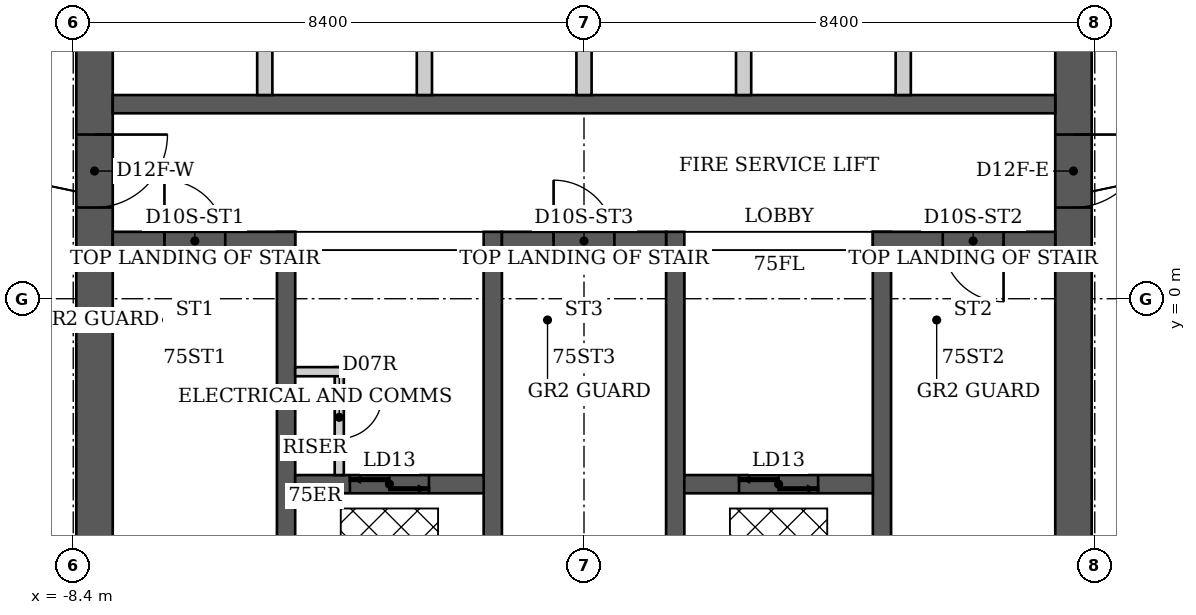
"""IFC4 building model, lengths in metres.
Left out: names, types, materials, properties, quantities, classifications, styles, units other than length and angle.
Written with IfcOpenShell. Run it as: python <this file> out.ifc"""

import sys

from ifc_helpers import new_model, si_unit, direction, frame, frame_2d, origin, place, context, subcontext, project, spatial, polyline, rectangle, outline, extrude, element, fill, save


model = new_model("IFC4")
c1 = context("Model", 3, precision=1e-05, world=origin(), true_north=direction((0.0, 1.0)))
c2 = subcontext(c1, "Body", "Model", "MODEL_VIEW")
j1 = project(units=[si_unit("LENGTHUNIT", "METRE"), si_unit("PLANEANGLEUNIT", "RADIAN")], contexts=[c1])
p1 = place(None, origin())
s1 = spatial("IfcSite", under=j1, at=p1, CompositionType="ELEMENT")
p2 = place(p1, origin())
s2 = spatial("IfcBuilding", under=s1, at=p2, CompositionType="ELEMENT")
p3 = place(p2, frame((0.0, 0.0, 298.8)))
s3 = spatial("IfcBuildingStorey", under=s2, at=p3, CompositionType="ELEMENT", Elevation=298.8)
p4 = place(p3, frame((-8.05, -6.1, 0.0), z_axis=(0.0, 0.0, 1.0), x_axis=(0.0, 1.0, 0.0)))
e1 = element("IfcWall", 1, at=p4, inside=s3, PredefinedType="SHEAR", context=c2, shape_type="SweptSolid", body=[
    extrude(outline(polyline([(0.0, 0.0), (12.2, 0.0), (12.2, 14.117), (0.0, 10.848), (0.0, 0.0)])), frame((0.0, 0.3, 0.0), z_axis=(0.0, -1.0, 0.0), x_axis=(1.0, 0.0, 0.0)), (0.0, 0.0, 1.0), 0.6),
])
p5 = place(p4, frame((7.6, 0.0, 0.0)))
e2 = element("IfcOpeningElement", 2, at=p5, cuts=e1, PredefinedType="OPENING", context=c2, shape_type="SweptSolid", body=[
    extrude(rectangle(XDim=1.2, YDim=2.2, at=frame_2d((0.6, 1.1))), frame((0.0, 0.3, 0.0), z_axis=(0.0, -1.0, 0.0), x_axis=(1.0, 0.0, 0.0)), (0.0, 0.0, 1.0), 0.6),
])
p6 = place(p3, frame((8.05, -6.1, 0.0), z_axis=(0.0, 0.0, 1.0), x_axis=(0.0, 1.0, 0.0)))
e3 = element("IfcWall", 3, at=p6, inside=s3, PredefinedType="SHEAR", context=c2, shape_type="SweptSolid", body=[
    extrude(outline(polyline([(0.0, 0.0), (12.2, 0.0), (12.2, 14.117), (0.0, 10.848), (0.0, 0.0)])), frame((0.0, 0.3, 0.0), z_axis=(0.0, -1.0, 0.0), x_axis=(1.0, 0.0, 0.0)), (0.0, 0.0, 1.0), 0.6),
])
p7 = place(p6, frame((7.6, 0.0, 0.0)))
e4 = element("IfcOpeningElement", 4, at=p7, cuts=e3, PredefinedType="OPENING", context=c2, shape_type="SweptSolid", body=[
    extrude(rectangle(XDim=1.2, YDim=2.2, at=frame_2d((0.6, 1.1))), frame((0.0, 0.3, 0.0), z_axis=(0.0, -1.0, 0.0), x_axis=(1.0, 0.0, 0.0)), (0.0, 0.0, 1.0), 0.6),
])
for number, where, z_axis, x_axis in (
    (5, (-4.9, -6.1, 0.0), (0.0, 0.0, 1.0), (0.0, 1.0, 0.0)),
    (6, (-1.5, -6.1, 0.0), (0.0, 0.0, 1.0), (0.0, 1.0, 0.0)),
    (7, (1.5, -6.1, 0.0), (0.0, 0.0, 1.0), (0.0, 1.0, 0.0)),
    (8, (4.9, -6.1, 0.0), (0.0, 0.0, 1.0), (0.0, 1.0, 0.0)),
):
    element("IfcWall", number, at=place(p3, frame(where, z_axis=z_axis, x_axis=x_axis)), inside=s3, PredefinedType="SHEAR", context=c2, shape_type="SweptSolid", body=[
        extrude(outline(polyline([(0.0, 0.0), (7.2, 0.0), (7.2, 12.777), (0.0, 10.848), (0.0, 0.0)])), frame((0.0, 0.15, 0.0), z_axis=(0.0, -1.0, 0.0), x_axis=(1.0, 0.0, 0.0)), (0.0, 0.0, 1.0), 0.3),
    ])
p8 = place(p3, frame((-7.75, 0.95, 0.0), z_axis=(0.0, 0.0, 1.0), x_axis=(1.0, 0.0, 0.0)))
e9 = element("IfcWall", 9, at=p8, inside=s3, PredefinedType="SHEAR", context=c2, shape_type="SweptSolid", body=[
    extrude(outline(polyline([(0.0, 0.0), (3.0, 0.0), (3.0, 12.697), (0.0, 12.697), (0.0, 0.0)])), frame((0.0, 0.15, 0.0), z_axis=(0.0, -1.0, 0.0), x_axis=(1.0, 0.0, 0.0)), (0.0, 0.0, 1.0), 0.3),
])
p9 = place(p8, frame((0.85, 0.0, 0.0)))
e10 = element("IfcOpeningElement", 10, at=p9, cuts=e9, PredefinedType="OPENING", context=c2, shape_type="SweptSolid", body=[
    extrude(rectangle(XDim=1.0, YDim=2.2, at=frame_2d((0.5, 1.1))), frame((0.0, 0.15, 0.0), z_axis=(0.0, -1.0, 0.0), x_axis=(1.0, 0.0, 0.0)), (0.0, 0.0, 1.0), 0.3),
])
p10 = place(p3, frame((-1.35, 0.95, 0.0), z_axis=(0.0, 0.0, 1.0), x_axis=(1.0, 0.0, 0.0)))
e11 = element("IfcWall", 11, at=p10, inside=s3, PredefinedType="SHEAR", context=c2, shape_type="SweptSolid", body=[
    extrude(outline(polyline([(0.0, 0.0), (2.7, 0.0), (2.7, 12.697), (0.0, 12.697), (0.0, 0.0)])), frame((0.0, 0.15, 0.0), z_axis=(0.0, -1.0, 0.0), x_axis=(1.0, 0.0, 0.0)), (0.0, 0.0, 1.0), 0.3),
])
p11 = place(p10, frame((0.85, 0.0, 0.0)))
e12 = element("IfcOpeningElement", 12, at=p11, cuts=e11, PredefinedType="OPENING", context=c2, shape_type="SweptSolid", body=[
    extrude(rectangle(XDim=1.0, YDim=2.2, at=frame_2d((0.5, 1.1))), frame((0.0, 0.15, 0.0), z_axis=(0.0, -1.0, 0.0), x_axis=(1.0, 0.0, 0.0)), (0.0, 0.0, 1.0), 0.3),
])
p12 = place(p3, frame((4.75, 0.95, 0.0), z_axis=(0.0, 0.0, 1.0), x_axis=(1.0, 0.0, 0.0)))
e13 = element("IfcWall", 13, at=p12, inside=s3, PredefinedType="SHEAR", context=c2, shape_type="SweptSolid", body=[
    extrude(outline(polyline([(0.0, 0.0), (3.0, 0.0), (3.0, 12.697), (0.0, 12.697), (0.0, 0.0)])), frame((0.0, 0.15, 0.0), z_axis=(0.0, -1.0, 0.0), x_axis=(1.0, 0.0, 0.0)), (0.0, 0.0, 1.0), 0.3),
])
p13 = place(p12, frame((1.15, 0.0, 0.0)))
e14 = element("IfcOpeningElement", 14, at=p13, cuts=e13, PredefinedType="OPENING", context=c2, shape_type="SweptSolid", body=[
    extrude(rectangle(XDim=1.0, YDim=2.2, at=frame_2d((0.5, 1.1))), frame((0.0, 0.15, 0.0), z_axis=(0.0, -1.0, 0.0), x_axis=(1.0, 0.0, 0.0)), (0.0, 0.0, 1.0), 0.3),
])
p14 = place(p3, frame((-4.75, -3.05, 0.0), z_axis=(0.0, 0.0, 1.0), x_axis=(1.0, 0.0, 0.0)))
e15 = element("IfcWall", 15, at=p14, inside=s3, PredefinedType="SHEAR", context=c2, shape_type="SweptSolid", body=[
    extrude(outline(polyline([(0.0, 0.0), (3.1, 0.0), (3.1, 11.625), (0.0, 11.625), (0.0, 0.0)])), frame((0.0, 0.15, 0.0), z_axis=(0.0, -1.0, 0.0), x_axis=(1.0, 0.0, 0.0)), (0.0, 0.0, 1.0), 0.3),
])
p15 = place(p14, frame((0.9, 0.0, 0.0)))
e16 = element("IfcOpeningElement", 16, at=p15, cuts=e15, PredefinedType="OPENING", context=c2, shape_type="SweptSolid", body=[
    extrude(rectangle(XDim=1.3, YDim=2.1, at=frame_2d((0.65, 1.05))), frame((0.0, 0.15, 0.0), z_axis=(0.0, -1.0, 0.0), x_axis=(1.0, 0.0, 0.0)), (0.0, 0.0, 1.0), 0.3),
])
p16 = place(p3, frame((1.65, -3.05, 0.0), z_axis=(0.0, 0.0, 1.0), x_axis=(1.0, 0.0, 0.0)))
e17 = element("IfcWall", 17, at=p16, inside=s3, PredefinedType="SHEAR", context=c2, shape_type="SweptSolid", body=[
    extrude(outline(polyline([(0.0, 0.0), (3.1, 0.0), (3.1, 11.625), (0.0, 11.625), (0.0, 0.0)])), frame((0.0, 0.15, 0.0), z_axis=(0.0, -1.0, 0.0), x_axis=(1.0, 0.0, 0.0)), (0.0, 0.0, 1.0), 0.3),
])
p17 = place(p16, frame((0.9, 0.0, 0.0)))
e18 = element("IfcOpeningElement", 18, at=p17, cuts=e17, PredefinedType="OPENING", context=c2, shape_type="SweptSolid", body=[
    extrude(rectangle(XDim=1.3, YDim=2.1, at=frame_2d((0.65, 1.05))), frame((0.0, 0.15, 0.0), z_axis=(0.0, -1.0, 0.0), x_axis=(1.0, 0.0, 0.0)), (0.0, 0.0, 1.0), 0.3),
])
p18 = place(p3, frame((-7.75, 3.2, 0.0), z_axis=(0.0, 0.0, 1.0), x_axis=(1.0, 0.0, 0.0)))
e19 = element("IfcWall", 19, at=p18, inside=s3, PredefinedType="SHEAR", context=c2, shape_type="SweptSolid", body=[
    extrude(outline(polyline([(0.0, 0.0), (15.5, 0.0), (15.5, 13.3), (0.0, 13.3), (0.0, 0.0)])), frame((0.0, 0.15, 0.0), z_axis=(0.0, -1.0, 0.0), x_axis=(1.0, 0.0, 0.0)), (0.0, 0.0, 1.0), 0.3),
])
for number, where, z_axis, x_axis in (
    (20, (-5.25, 3.35, 0.0), (0.0, 0.0, 1.0), (0.0, 1.0, 0.0)),
    (21, (-2.625, 3.35, 0.0), (0.0, 0.0, 1.0), (0.0, 1.0, 0.0)),
    (22, (0.0, 3.35, 0.0), (0.0, 0.0, 1.0), (0.0, 1.0, 0.0)),
    (23, (2.625, 3.35, 0.0), (0.0, 0.0, 1.0), (0.0, 1.0, 0.0)),
    (24, (5.25, 3.35, 0.0), (0.0, 0.0, 1.0), (0.0, 1.0, 0.0)),
):
    element("IfcWall", number, at=place(p3, frame(where, z_axis=z_axis, x_axis=x_axis)), inside=s3, PredefinedType="PARTITIONING", context=c2, shape_type="SweptSolid", body=[
        extrude(rectangle(XDim=2.75, YDim=0.25, at=frame_2d((1.375, 0.0))), origin(), (0.0, 0.0, 1.0), 14.233),
    ])
p19 = place(p3, frame((-4.025, -2.9, 0.0), z_axis=(0.0, 0.0, 1.0), x_axis=(0.0, 1.0, 0.0)))
e25 = element("IfcWall", 25, at=p19, inside=s3, PredefinedType="PARTITIONING", context=c2, shape_type="SweptSolid", body=[
    extrude(rectangle(XDim=1.775, YDim=0.15, at=frame_2d((0.887, 0.0))), origin(), (0.0, 0.0, 1.0), 5.0),
])
p20 = place(p19, frame((0.6, 0.0, 0.0)))
e26 = element("IfcOpeningElement", 26, at=p20, cuts=e25, PredefinedType="OPENING", context=c2, shape_type="SweptSolid", body=[
    extrude(rectangle(XDim=0.7, YDim=2.1, at=frame_2d((0.35, 1.05))), frame((0.0, 0.075, 0.0), z_axis=(0.0, -1.0, 0.0), x_axis=(1.0, 0.0, 0.0)), (0.0, 0.0, 1.0), 0.15),
])
p21 = place(p3, frame((-4.75, -1.2, 0.0), z_axis=(0.0, 0.0, 1.0), x_axis=(1.0, 0.0, 0.0)))
e27 = element("IfcWall", 27, at=p21, inside=s3, PredefinedType="PARTITIONING", context=c2, shape_type="SweptSolid", body=[
    extrude(rectangle(XDim=0.8, YDim=0.15, at=frame_2d((0.4, 0.0))), origin(), (0.0, 0.0, 1.0), 5.0),
])
p22 = place(p9, origin())
e28 = element("IfcDoor", 28, at=p22, inside=s3, OperationType="SINGLE_SWING_LEFT", PredefinedType="DOOR", context=c2, shape_type="SweptSolid", body=[
    extrude(rectangle(XDim=1.0, YDim=2.2, at=frame_2d((0.5, 1.1))), frame((0.0, 0.025, 0.0), z_axis=(0.0, -1.0, 0.0), x_axis=(1.0, 0.0, 0.0)), (0.0, 0.0, 1.0), 0.05),
])
fill(e10, e28)
p23 = place(p11, origin())
e29 = element("IfcDoor", 29, at=p23, inside=s3, OperationType="SINGLE_SWING_LEFT", PredefinedType="DOOR", context=c2, shape_type="SweptSolid", body=[
    extrude(rectangle(XDim=1.0, YDim=2.2, at=frame_2d((0.5, 1.1))), frame((0.0, 0.025, 0.0), z_axis=(0.0, -1.0, 0.0), x_axis=(1.0, 0.0, 0.0)), (0.0, 0.0, 1.0), 0.05),
])
fill(e12, e29)
p24 = place(p13, origin())
e30 = element("IfcDoor", 30, at=p24, inside=s3, OperationType="SINGLE_SWING_RIGHT", PredefinedType="DOOR", context=c2, shape_type="SweptSolid", body=[
    extrude(rectangle(XDim=1.0, YDim=2.2, at=frame_2d((0.5, 1.1))), frame((0.0, 0.025, 0.0), z_axis=(0.0, -1.0, 0.0), x_axis=(1.0, 0.0, 0.0)), (0.0, 0.0, 1.0), 0.05),
])
fill(e14, e30)
p25 = place(p5, origin())
e31 = element("IfcDoor", 31, at=p25, inside=s3, OperationType="SINGLE_SWING_RIGHT", PredefinedType="DOOR", context=c2, shape_type="SweptSolid", body=[
    extrude(rectangle(XDim=1.2, YDim=2.2, at=frame_2d((0.6, 1.1))), frame((0.0, 0.025, 0.0), z_axis=(0.0, -1.0, 0.0), x_axis=(1.0, 0.0, 0.0)), (0.0, 0.0, 1.0), 0.05),
])
fill(e2, e31)
p26 = place(p7, origin())
e32 = element("IfcDoor", 32, at=p26, inside=s3, OperationType="SINGLE_SWING_RIGHT", PredefinedType="DOOR", context=c2, shape_type="SweptSolid", body=[
    extrude(rectangle(XDim=1.2, YDim=2.2, at=frame_2d((0.6, 1.1))), frame((0.0, 0.025, 0.0), z_axis=(0.0, -1.0, 0.0), x_axis=(1.0, 0.0, 0.0)), (0.0, 0.0, 1.0), 0.05),
])
fill(e4, e32)
p27 = place(p20, origin())
e33 = element("IfcDoor", 33, at=p27, inside=s3, OperationType="SINGLE_SWING_RIGHT", PredefinedType="DOOR", context=c2, shape_type="SweptSolid", body=[
    extrude(rectangle(XDim=0.7, YDim=2.1, at=frame_2d((0.35, 1.05))), frame((0.0, 0.025, 0.0), z_axis=(0.0, -1.0, 0.0), x_axis=(1.0, 0.0, 0.0)), (0.0, 0.0, 1.0), 0.05),
])
fill(e26, e33)
p28 = place(p15, origin())
e34 = element("IfcDoor", 34, at=p28, inside=s3, OperationType="DOUBLE_DOOR_SLIDING", PredefinedType="DOOR", context=c2, shape_type="SweptSolid", body=[
    extrude(rectangle(XDim=1.3, YDim=2.1, at=frame_2d((0.65, 1.05))), frame((0.0, 0.025, 0.0), z_axis=(0.0, -1.0, 0.0), x_axis=(1.0, 0.0, 0.0)), (0.0, 0.0, 1.0), 0.05),
])
fill(e16, e34)
p29 = place(p17, origin())
e35 = element("IfcDoor", 35, at=p29, inside=s3, OperationType="DOUBLE_DOOR_SLIDING", PredefinedType="DOOR", context=c2, shape_type="SweptSolid", body=[
    extrude(rectangle(XDim=1.3, YDim=2.1, at=frame_2d((0.65, 1.05))), frame((0.0, 0.025, 0.0), z_axis=(0.0, -1.0, 0.0), x_axis=(1.0, 0.0, 0.0)), (0.0, 0.0, 1.0), 0.05),
])
fill(e18, e35)
save(model, sys.argv[1])
